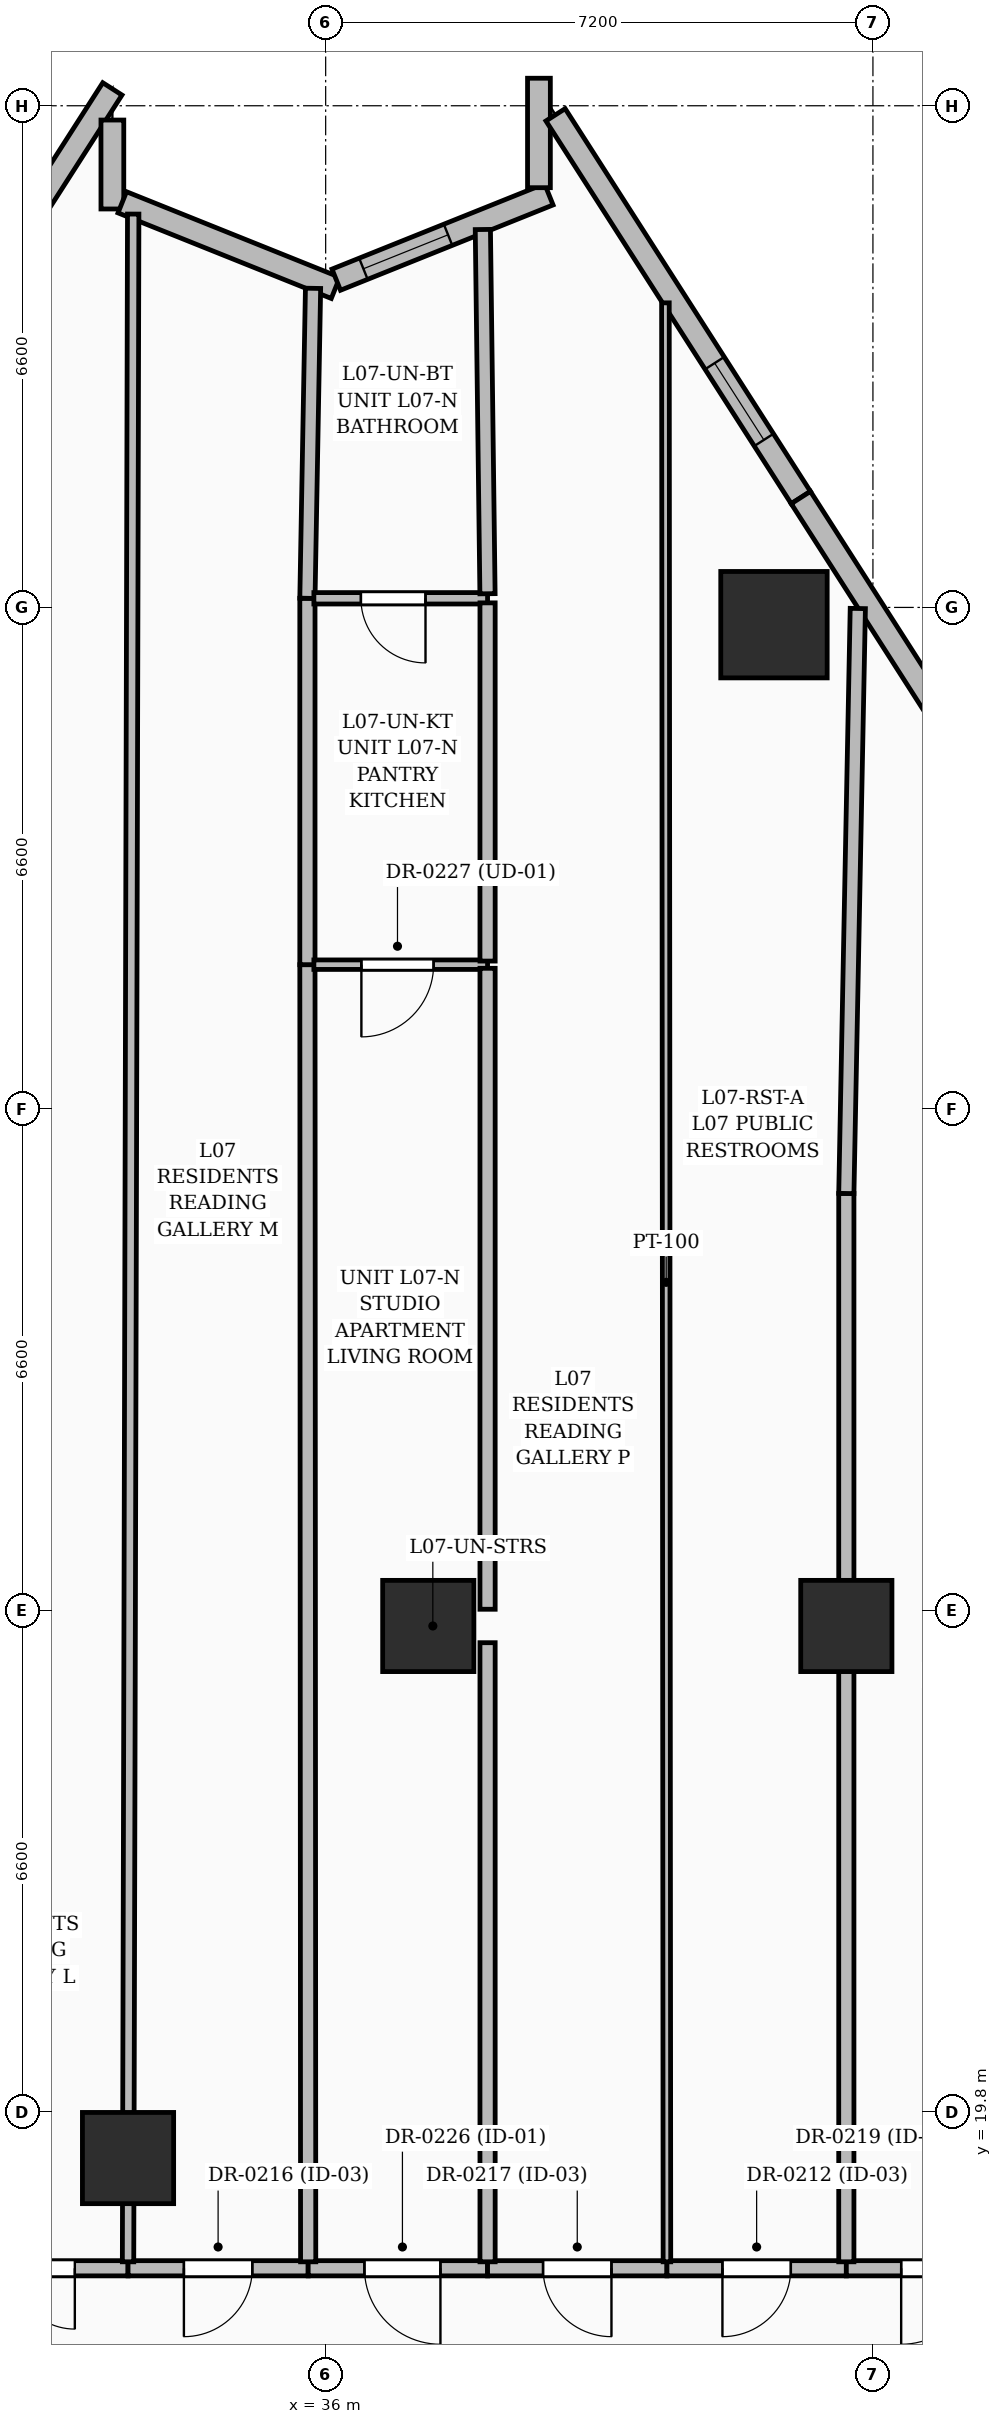
"""IFC4 building model, lengths in metres.
Left out: names, types, materials, properties, quantities, classifications, styles, units other than length and angle.
Written with IfcOpenShell. Run it as: python <this file> out.ifc"""

import sys

from ifc_helpers import new_model, si_unit, direction, frame, frame_2d, origin, origin_2d, place, context, subcontext, project, spatial, rectangle, extrude, element, fill, save


model = new_model("IFC4")
c1 = context("Model", 3, precision=1e-05, world=origin(), true_north=direction((0.0, 1.0)))
c2 = subcontext(c1, "Body", "Model", "MODEL_VIEW")
j1 = project(units=[si_unit("LENGTHUNIT", "METRE"), si_unit("PLANEANGLEUNIT", "RADIAN")], contexts=[c1])
p1 = place(None, origin())
s1 = spatial("IfcSite", under=j1, at=p1, CompositionType="ELEMENT")
p2 = place(p1, origin())
s2 = spatial("IfcBuilding", under=s1, at=p2, CompositionType="ELEMENT")
p3 = place(p2, frame((0.0, 0.0, 35.4)))
s3 = spatial("IfcBuildingStorey", under=s2, at=p3, CompositionType="ELEMENT", Elevation=35.4)
for number, where, z_axis, x_axis in (
    (1, (42.85, 26.2, 0.0), (0.0, 0.0, 1.0), (1.0, 0.0, 0.0)),
    (2, (37.35, 26.2, 0.0), (0.0, 0.0, 1.0), (1.0, 0.0, 0.0)),
    (3, (33.4, 19.2, 0.0), (0.0, 0.0, 1.0), (1.0, 0.0, 0.0)),
):
    element("IfcColumn", number, at=place(p3, frame(where, z_axis=z_axis, x_axis=x_axis)), inside=s3, PredefinedType="COLUMN", context=c2, shape_type="SweptSolid", body=[
        extrude(rectangle(XDim=1.2, YDim=1.2, at=origin_2d()), origin(), (0.0, 0.0, 1.0), 3.6),
    ])
p4 = place(p3, frame((41.898, 39.373, 0.0), z_axis=(0.0, 0.0, 1.0), x_axis=(1.0, 0.0, 0.0)))
e4 = element("IfcColumn", 4, at=p4, inside=s3, PredefinedType="COLUMN", context=c2, shape_type="SweptSolid", body=[
    extrude(rectangle(XDim=1.4, YDim=1.4, at=origin_2d()), origin(), (0.0, 0.0, 1.0), 3.6),
])
p5 = place(p3, frame((29.925, 41.321, 0.0), z_axis=(0.0, 0.0, 1.0), x_axis=(0.53953502124, 0.841963158847, 0.0)))
e5 = element("IfcWall", 5, at=p5, inside=s3, PredefinedType="SOLIDWALL", context=c2, shape_type="SweptSolid", body=[
    extrude(rectangle(XDim=6.059, YDim=0.3, at=frame_2d((3.029, 0.0))), origin(), (0.0, 0.0, 1.0), 3.35),
])
p6 = place(p5, frame((2.05, 0.0, 0.8)))
e6 = element("IfcOpeningElement", 6, at=p6, cuts=e5, PredefinedType="OPENING", context=c2, shape_type="SweptSolid", body=[
    extrude(rectangle(XDim=1.2, YDim=1.8, at=frame_2d((0.6, 0.9))), frame((0.0, 0.16, 0.0), z_axis=(0.0, -1.0, 0.0), x_axis=(1.0, 0.0, 0.0)), (0.0, 0.0, 1.0), 0.32),
])
p7 = place(p3, frame((33.194, 46.012, 0.0), z_axis=(0.0, 0.0, 1.0), x_axis=(0.0, -1.0, 0.0)))
e7 = element("IfcWall", 7, at=p7, inside=s3, PredefinedType="SOLIDWALL", context=c2, shape_type="SweptSolid", body=[
    extrude(rectangle(XDim=1.17, YDim=0.3, at=frame_2d((0.585, 0.0))), origin(), (0.0, 0.0, 1.0), 3.35),
])
p8 = place(p3, frame((33.324, 44.93, 0.0), z_axis=(0.0, 0.0, 1.0), x_axis=(0.928091921944, -0.372351157407, 0.0)))
e8 = element("IfcWall", 8, at=p8, inside=s3, PredefinedType="SOLIDWALL", context=c2, shape_type="SweptSolid", body=[
    extrude(rectangle(XDim=3.023, YDim=0.3, at=frame_2d((1.512, 0.0))), origin(), (0.0, 0.0, 1.0), 3.35),
])
p9 = place(p3, frame((36.139, 43.912, 0.0), z_axis=(0.0, 0.0, 1.0), x_axis=(0.928057043086, 0.372438081804, 0.0)))
e9 = element("IfcWall", 9, at=p9, inside=s3, PredefinedType="SOLIDWALL", context=c2, shape_type="SweptSolid", body=[
    extrude(rectangle(XDim=3.013, YDim=0.3, at=frame_2d((1.507, 0.0))), origin(), (0.0, 0.0, 1.0), 3.35),
])
p10 = place(p9, frame((0.385, 0.0, 0.8)))
e10 = element("IfcOpeningElement", 10, at=p10, cuts=e9, PredefinedType="OPENING", context=c2, shape_type="SweptSolid", body=[
    extrude(rectangle(XDim=1.2, YDim=1.8, at=frame_2d((0.6, 0.9))), frame((0.0, 0.16, 0.0), z_axis=(0.0, -1.0, 0.0), x_axis=(1.0, 0.0, 0.0)), (0.0, 0.0, 1.0), 0.32),
])
p11 = place(p3, frame((38.806, 45.122, 0.0), z_axis=(0.0, 0.0, 1.0), x_axis=(0.0, 1.0, 0.0)))
e11 = element("IfcWall", 11, at=p11, inside=s3, PredefinedType="SOLIDWALL", context=c2, shape_type="SweptSolid", body=[
    extrude(rectangle(XDim=1.44, YDim=0.3, at=frame_2d((0.72, 0.0))), origin(), (0.0, 0.0, 1.0), 3.35),
])
p12 = place(p3, frame((39.024, 46.081, 0.0), z_axis=(0.0, 0.0, 1.0), x_axis=(0.539527381639, -0.8419680543, 0.0)))
e12 = element("IfcWall", 12, at=p12, inside=s3, PredefinedType="SOLIDWALL", context=c2, shape_type="SweptSolid", body=[
    extrude(rectangle(XDim=5.981, YDim=0.3, at=frame_2d((2.99, 0.0))), origin(), (0.0, 0.0, 1.0), 3.35),
])
p13 = place(p12, frame((3.88, 0.0, 0.8)))
e13 = element("IfcOpeningElement", 13, at=p13, cuts=e12, PredefinedType="OPENING", context=c2, shape_type="SweptSolid", body=[
    extrude(rectangle(XDim=1.2, YDim=1.8, at=frame_2d((0.6, 0.9))), frame((0.0, 0.16, 0.0), z_axis=(0.0, -1.0, 0.0), x_axis=(1.0, 0.0, 0.0)), (0.0, 0.0, 1.0), 0.32),
])
p14 = place(p3, frame((42.251, 41.045, 0.0), z_axis=(0.0, 0.0, 1.0), x_axis=(0.539526045631, -0.841968910403, 0.0)))
e14 = element("IfcWall", 14, at=p14, inside=s3, PredefinedType="SOLIDWALL", context=c2, shape_type="SweptSolid", body=[
    extrude(rectangle(XDim=6.526, YDim=0.3, at=frame_2d((3.263, 0.0))), origin(), (0.0, 0.0, 1.0), 3.35),
])
p15 = place(p14, frame((3.425, 0.0, 0.8)))
e15 = element("IfcOpeningElement", 15, at=p15, cuts=e14, PredefinedType="OPENING", context=c2, shape_type="SweptSolid", body=[
    extrude(rectangle(XDim=1.2, YDim=1.8, at=frame_2d((0.6, 0.9))), frame((0.0, 0.16, 0.0), z_axis=(0.0, -1.0, 0.0), x_axis=(1.0, 0.0, 0.0)), (0.0, 0.0, 1.0), 0.32),
])
p16 = place(p3, frame((33.4, 17.75, 0.0), z_axis=(0.0, 0.0, 1.0), x_axis=(-1.0, 0.0, 0.0)))
e16 = element("IfcWall", 16, at=p16, inside=s3, PredefinedType="PARTITIONING", context=c2, shape_type="SweptSolid", body=[
    extrude(rectangle(XDim=3.0, YDim=0.2, at=frame_2d((1.5, 0.0))), origin(), (0.0, 0.0, 1.0), 3.35),
])
p17 = place(p16, frame((0.7, 0.0, 0.0)))
e17 = element("IfcOpeningElement", 17, at=p17, cuts=e16, PredefinedType="OPENING", context=c2, shape_type="SweptSolid", body=[
    extrude(rectangle(XDim=1.6, YDim=2.3, at=frame_2d((0.8, 1.15))), frame((0.0, 0.11, 0.0), z_axis=(0.0, -1.0, 0.0), x_axis=(1.0, 0.0, 0.0)), (0.0, 0.0, 1.0), 0.22),
])
p18 = place(p3, frame((35.77, 17.75, 0.0), z_axis=(0.0, 0.0, 1.0), x_axis=(-1.0, 0.0, 0.0)))
e18 = element("IfcWall", 18, at=p18, inside=s3, PredefinedType="PARTITIONING", context=c2, shape_type="SweptSolid", body=[
    extrude(rectangle(XDim=2.37, YDim=0.2, at=frame_2d((1.185, 0.0))), origin(), (0.0, 0.0, 1.0), 2.309),
])
p19 = place(p18, frame((0.735, 0.0, 0.0)))
e19 = element("IfcOpeningElement", 19, at=p19, cuts=e18, PredefinedType="OPENING", context=c2, shape_type="SweptSolid", body=[
    extrude(rectangle(XDim=0.9, YDim=2.1, at=frame_2d((0.45, 1.05))), frame((0.0, 0.11, 0.0), z_axis=(0.0, -1.0, 0.0), x_axis=(1.0, 0.0, 0.0)), (0.0, 0.0, 1.0), 0.22),
])
p20 = place(p3, frame((38.13, 17.75, 0.0), z_axis=(0.0, 0.0, 1.0), x_axis=(-1.0, 0.0, 0.0)))
e20 = element("IfcWall", 20, at=p20, inside=s3, PredefinedType="PARTITIONING", context=c2, shape_type="SweptSolid", body=[
    extrude(rectangle(XDim=2.36, YDim=0.2, at=frame_2d((1.18, 0.0))), origin(), (0.0, 0.0, 1.0), 3.35),
])
p21 = place(p20, frame((0.62, 0.0, 0.0)))
e21 = element("IfcOpeningElement", 21, at=p21, cuts=e20, PredefinedType="OPENING", context=c2, shape_type="SweptSolid", body=[
    extrude(rectangle(XDim=1.0, YDim=2.2, at=frame_2d((0.5, 1.1))), frame((0.0, 0.11, 0.0), z_axis=(0.0, -1.0, 0.0), x_axis=(1.0, 0.0, 0.0)), (0.0, 0.0, 1.0), 0.22),
])
p22 = place(p3, frame((40.49, 17.75, 0.0), z_axis=(0.0, 0.0, 1.0), x_axis=(-1.0, 0.0, 0.0)))
e22 = element("IfcWall", 22, at=p22, inside=s3, PredefinedType="PARTITIONING", context=c2, shape_type="SweptSolid", body=[
    extrude(rectangle(XDim=2.36, YDim=0.2, at=frame_2d((1.18, 0.0))), origin(), (0.0, 0.0, 1.0), 3.35),
])
p23 = place(p22, frame((0.73, 0.0, 0.0)))
e23 = element("IfcOpeningElement", 23, at=p23, cuts=e22, PredefinedType="OPENING", context=c2, shape_type="SweptSolid", body=[
    extrude(rectangle(XDim=0.9, YDim=2.1, at=frame_2d((0.45, 1.05))), frame((0.0, 0.11, 0.0), z_axis=(0.0, -1.0, 0.0), x_axis=(1.0, 0.0, 0.0)), (0.0, 0.0, 1.0), 0.22),
])
p24 = place(p3, frame((42.85, 17.75, 0.0), z_axis=(0.0, 0.0, 1.0), x_axis=(-1.0, 0.0, 0.0)))
e24 = element("IfcWall", 24, at=p24, inside=s3, PredefinedType="PARTITIONING", context=c2, shape_type="SweptSolid", body=[
    extrude(rectangle(XDim=2.36, YDim=0.2, at=frame_2d((1.18, 0.0))), origin(), (0.0, 0.0, 1.0), 3.35),
])
p25 = place(p24, frame((0.73, 0.0, 0.0)))
e25 = element("IfcOpeningElement", 25, at=p25, cuts=e24, PredefinedType="OPENING", context=c2, shape_type="SweptSolid", body=[
    extrude(rectangle(XDim=0.9, YDim=2.1, at=frame_2d((0.45, 1.05))), frame((0.0, 0.11, 0.0), z_axis=(0.0, -1.0, 0.0), x_axis=(1.0, 0.0, 0.0)), (0.0, 0.0, 1.0), 0.22),
])
p26 = place(p3, frame((47.27, 17.75, 0.0), z_axis=(0.0, 0.0, 1.0), x_axis=(-1.0, 0.0, 0.0)))
e26 = element("IfcWall", 26, at=p26, inside=s3, PredefinedType="PARTITIONING", context=c2, shape_type="SweptSolid", body=[
    extrude(rectangle(XDim=4.42, YDim=0.2, at=frame_2d((2.21, 0.0))), origin(), (0.0, 0.0, 1.0), 2.309),
])
p27 = place(p26, frame((2.698, 0.0, 0.0)))
e27 = element("IfcOpeningElement", 27, at=p27, cuts=e26, PredefinedType="OPENING", context=c2, shape_type="SweptSolid", body=[
    extrude(rectangle(XDim=1.0, YDim=2.2, at=frame_2d((0.5, 1.1))), frame((0.0, 0.11, 0.0), z_axis=(0.0, -1.0, 0.0), x_axis=(1.0, 0.0, 0.0)), (0.0, 0.0, 1.0), 0.22),
])
p28 = place(p3, frame((33.4, 17.835, 0.0), z_axis=(0.0, 0.0, 1.0), x_axis=(0.002519340237, 0.999996826457, 0.0)))
e28 = element("IfcWall", 28, at=p28, inside=s3, PredefinedType="PARTITIONING", context=c2, shape_type="SweptSolid", body=[
    extrude(rectangle(XDim=26.94, YDim=0.15, at=frame_2d((13.47, 0.0))), origin(), (0.0, 0.0, 1.0), 2.228),
])
p29 = place(p3, frame((35.77, 17.835, 0.0), z_axis=(0.0, 0.0, 1.0), x_axis=(-0.0005865689, 0.999999827968, 0.0)))
e29 = element("IfcWall", 29, at=p29, inside=s3, PredefinedType="PARTITIONING", context=c2, shape_type="SweptSolid", body=[
    extrude(rectangle(XDim=17.065, YDim=0.2, at=frame_2d((8.532, 0.0))), origin(), (0.0, 0.0, 1.0), 2.228),
])
p30 = place(p3, frame((35.76, 34.9, 0.0), z_axis=(0.0, 0.0, 1.0), x_axis=(0.0, 1.0, 0.0)))
e30 = element("IfcWall", 30, at=p30, inside=s3, PredefinedType="PARTITIONING", context=c2, shape_type="SweptSolid", body=[
    extrude(rectangle(XDim=4.82, YDim=0.2, at=frame_2d((2.41, 0.0))), origin(), (0.0, 0.0, 1.0), 2.37),
])
p31 = place(p3, frame((35.76, 39.72, 0.0), z_axis=(0.0, 0.0, 1.0), x_axis=(0.018136384294, 0.999835522256, 0.0)))
e31 = element("IfcWall", 31, at=p31, inside=s3, PredefinedType="PARTITIONING", context=c2, shape_type="SweptSolid", body=[
    extrude(rectangle(XDim=4.079, YDim=0.2, at=frame_2d((2.04, 0.0))), origin(), (0.0, 0.0, 1.0), 3.35),
])
p32 = place(p3, frame((38.13, 34.9, 0.0), z_axis=(0.0, 0.0, 1.0), x_axis=(-1.0, 0.0, 0.0)))
e32 = element("IfcWall", 32, at=p32, inside=s3, PredefinedType="PARTITIONING", context=c2, shape_type="SweptSolid", body=[
    extrude(rectangle(XDim=2.285, YDim=0.125, at=frame_2d((1.143, 0.0))), origin(), (0.0, 0.0, 1.0), 3.35),
])
p33 = place(p32, frame((0.71, 0.0, 0.0)))
e33 = element("IfcOpeningElement", 33, at=p33, cuts=e32, PredefinedType="OPENING", context=c2, shape_type="SweptSolid", body=[
    extrude(rectangle(XDim=0.95, YDim=2.2, at=frame_2d((0.475, 1.1))), frame((0.0, 0.072, 0.0), z_axis=(0.0, -1.0, 0.0), x_axis=(1.0, 0.0, 0.0)), (0.0, 0.0, 1.0), 0.145),
])
p34 = place(p3, frame((38.13, 17.835, 0.0), z_axis=(0.0, 0.0, 1.0), x_axis=(0.0, 1.0, 0.0)))
e34 = element("IfcWall", 34, at=p34, inside=s3, PredefinedType="PARTITIONING", context=c2, shape_type="SweptSolid", body=[
    extrude(rectangle(XDim=8.145, YDim=0.2, at=frame_2d((4.073, 0.0))), origin(), (0.0, 0.0, 1.0), 3.35),
])
p35 = place(p3, frame((38.13, 26.42, 0.0), z_axis=(0.0, 0.0, 1.0), x_axis=(0.0, 1.0, 0.0)))
e35 = element("IfcWall", 35, at=p35, inside=s3, PredefinedType="PARTITIONING", context=c2, shape_type="SweptSolid", body=[
    extrude(rectangle(XDim=8.433, YDim=0.2, at=frame_2d((4.216, 0.0))), origin(), (0.0, 0.0, 1.0), 2.712),
])
p36 = place(p3, frame((38.13, 39.72, 0.0), z_axis=(0.0, 0.0, 1.0), x_axis=(-1.0, 0.0, 0.0)))
e36 = element("IfcWall", 36, at=p36, inside=s3, PredefinedType="PARTITIONING", context=c2, shape_type="SweptSolid", body=[
    extrude(rectangle(XDim=2.285, YDim=0.15, at=frame_2d((1.143, 0.0))), origin(), (0.0, 0.0, 1.0), 2.37),
])
p37 = place(p36, frame((0.816, 0.0, 0.0)))
e37 = element("IfcOpeningElement", 37, at=p37, cuts=e36, PredefinedType="OPENING", context=c2, shape_type="SweptSolid", body=[
    extrude(rectangle(XDim=0.85, YDim=2.1, at=frame_2d((0.425, 1.05))), frame((0.0, 0.085, 0.0), z_axis=(0.0, -1.0, 0.0), x_axis=(1.0, 0.0, 0.0)), (0.0, 0.0, 1.0), 0.17),
])
p38 = place(p3, frame((38.13, 34.948, 0.0), z_axis=(0.0, 0.0, 1.0), x_axis=(0.0, 1.0, 0.0)))
e38 = element("IfcWall", 38, at=p38, inside=s3, PredefinedType="PARTITIONING", context=c2, shape_type="SweptSolid", body=[
    extrude(rectangle(XDim=4.712, YDim=0.2, at=frame_2d((2.356, 0.0))), origin(), (0.0, 0.0, 1.0), 2.37),
])
p39 = place(p3, frame((38.129, 39.78, 0.0), z_axis=(0.0, 0.0, 1.0), x_axis=(-0.01278680862, 0.999918245421, 0.0)))
e39 = element("IfcWall", 39, at=p39, inside=s3, PredefinedType="PARTITIONING", context=c2, shape_type="SweptSolid", body=[
    extrude(rectangle(XDim=4.792, YDim=0.2, at=frame_2d((2.396, 0.0))), origin(), (0.0, 0.0, 1.0), 3.35),
])
p40 = place(p3, frame((40.49, 17.835, 0.0), z_axis=(0.0, 0.0, 1.0), x_axis=(-0.000767321348, 0.999999705609, 0.0)))
e40 = element("IfcWall", 40, at=p40, inside=s3, PredefinedType="PARTITIONING", context=c2, shape_type="SweptSolid", body=[
    extrude(rectangle(XDim=25.772, YDim=0.1, at=frame_2d((12.886, 0.0))), origin(), (0.0, 0.0, 1.0), 2.309),
])
p41 = place(p3, frame((42.85, 17.835, 0.0), z_axis=(0.0, 0.0, 1.0), x_axis=(0.0, 1.0, 0.0)))
e41 = element("IfcWall", 41, at=p41, inside=s3, PredefinedType="PARTITIONING", context=c2, shape_type="SweptSolid", body=[
    extrude(rectangle(XDim=14.055, YDim=0.2, at=frame_2d((7.027, 0.0))), origin(), (0.0, 0.0, 1.0), 2.228),
])
p42 = place(p3, frame((42.85, 31.89, 0.0), z_axis=(0.0, 0.0, 1.0), x_axis=(0.019600966642, 0.999807882599, 0.0)))
e42 = element("IfcWall", 42, at=p42, inside=s3, PredefinedType="PARTITIONING", context=c2, shape_type="SweptSolid", body=[
    extrude(rectangle(XDim=7.698, YDim=0.2, at=frame_2d((3.849, 0.0))), origin(), (0.0, 0.0, 1.0), 2.37),
])
p43 = place(p10, origin())
e43 = element("IfcWindow", 43, at=p43, inside=s3, PartitioningType="SINGLE_PANEL", PredefinedType="WINDOW", context=c2, shape_type="SweptSolid", body=[
    extrude(rectangle(XDim=1.2, YDim=1.8, at=frame_2d((0.6, 0.9))), frame((0.0, 0.03, 0.0), z_axis=(0.0, -1.0, 0.0), x_axis=(1.0, 0.0, 0.0)), (0.0, 0.0, 1.0), 0.06),
])
fill(e10, e43)
p44 = place(p13, origin())
e44 = element("IfcWindow", 44, at=p44, inside=s3, PartitioningType="SINGLE_PANEL", PredefinedType="WINDOW", context=c2, shape_type="SweptSolid", body=[
    extrude(rectangle(XDim=1.2, YDim=1.8, at=frame_2d((0.6, 0.9))), frame((0.0, 0.03, 0.0), z_axis=(0.0, -1.0, 0.0), x_axis=(1.0, 0.0, 0.0)), (0.0, 0.0, 1.0), 0.06),
])
fill(e13, e44)
p45 = place(p25, origin())
e45 = element("IfcDoor", 45, at=p45, inside=s3, OperationType="SINGLE_SWING_RIGHT", PredefinedType="DOOR", context=c2, shape_type="SweptSolid", body=[
    extrude(rectangle(XDim=0.9, YDim=2.1, at=frame_2d((0.45, 1.05))), frame((0.0, 0.025, 0.0), z_axis=(0.0, -1.0, 0.0), x_axis=(1.0, 0.0, 0.0)), (0.0, 0.0, 1.0), 0.05),
])
fill(e25, e45)
p46 = place(p17, origin())
e46 = element("IfcDoor", 46, at=p46, inside=s3, OperationType="DOUBLE_DOOR_SINGLE_SWING", PredefinedType="DOOR", context=c2, shape_type="SweptSolid", body=[
    extrude(rectangle(XDim=1.6, YDim=2.3, at=frame_2d((0.8, 1.15))), frame((0.0, 0.025, 0.0), z_axis=(0.0, -1.0, 0.0), x_axis=(1.0, 0.0, 0.0)), (0.0, 0.0, 1.0), 0.05),
])
fill(e17, e46)
p47 = place(p19, origin())
e47 = element("IfcDoor", 47, at=p47, inside=s3, OperationType="SINGLE_SWING_RIGHT", PredefinedType="DOOR", context=c2, shape_type="SweptSolid", body=[
    extrude(rectangle(XDim=0.9, YDim=2.1, at=frame_2d((0.45, 1.05))), frame((0.0, 0.025, 0.0), z_axis=(0.0, -1.0, 0.0), x_axis=(1.0, 0.0, 0.0)), (0.0, 0.0, 1.0), 0.05),
])
fill(e19, e47)
p48 = place(p23, origin())
e48 = element("IfcDoor", 48, at=p48, inside=s3, OperationType="SINGLE_SWING_LEFT", PredefinedType="DOOR", context=c2, shape_type="SweptSolid", body=[
    extrude(rectangle(XDim=0.9, YDim=2.1, at=frame_2d((0.45, 1.05))), frame((0.0, 0.025, 0.0), z_axis=(0.0, -1.0, 0.0), x_axis=(1.0, 0.0, 0.0)), (0.0, 0.0, 1.0), 0.05),
])
fill(e23, e48)
p49 = place(p27, origin())
e49 = element("IfcDoor", 49, at=p49, inside=s3, OperationType="SINGLE_SWING_RIGHT", PredefinedType="DOOR", context=c2, shape_type="SweptSolid", body=[
    extrude(rectangle(XDim=1.0, YDim=2.2, at=frame_2d((0.5, 1.1))), frame((0.0, 0.025, 0.0), z_axis=(0.0, -1.0, 0.0), x_axis=(1.0, 0.0, 0.0)), (0.0, 0.0, 1.0), 0.05),
])
fill(e27, e49)
p50 = place(p21, origin())
e50 = element("IfcDoor", 50, at=p50, inside=s3, OperationType="SINGLE_SWING_LEFT", PredefinedType="DOOR", context=c2, shape_type="SweptSolid", body=[
    extrude(rectangle(XDim=1.0, YDim=2.2, at=frame_2d((0.5, 1.1))), frame((0.0, 0.025, 0.0), z_axis=(0.0, -1.0, 0.0), x_axis=(1.0, 0.0, 0.0)), (0.0, 0.0, 1.0), 0.05),
])
fill(e21, e50)
p51 = place(p33, origin())
e51 = element("IfcDoor", 51, at=p51, inside=s3, OperationType="SINGLE_SWING_RIGHT", PredefinedType="DOOR", context=c2, shape_type="SweptSolid", body=[
    extrude(rectangle(XDim=0.95, YDim=2.2, at=frame_2d((0.475, 1.1))), frame((0.0, 0.025, 0.0), z_axis=(0.0, -1.0, 0.0), x_axis=(1.0, 0.0, 0.0)), (0.0, 0.0, 1.0), 0.05),
])
fill(e33, e51)
p52 = place(p37, origin())
e52 = element("IfcDoor", 52, at=p52, inside=s3, OperationType="SINGLE_SWING_LEFT", PredefinedType="DOOR", context=c2, shape_type="SweptSolid", body=[
    extrude(rectangle(XDim=0.85, YDim=2.1, at=frame_2d((0.425, 1.05))), frame((0.0, 0.025, 0.0), z_axis=(0.0, -1.0, 0.0), x_axis=(1.0, 0.0, 0.0)), (0.0, 0.0, 1.0), 0.05),
])
fill(e37, e52)
save(model, sys.argv[1])
